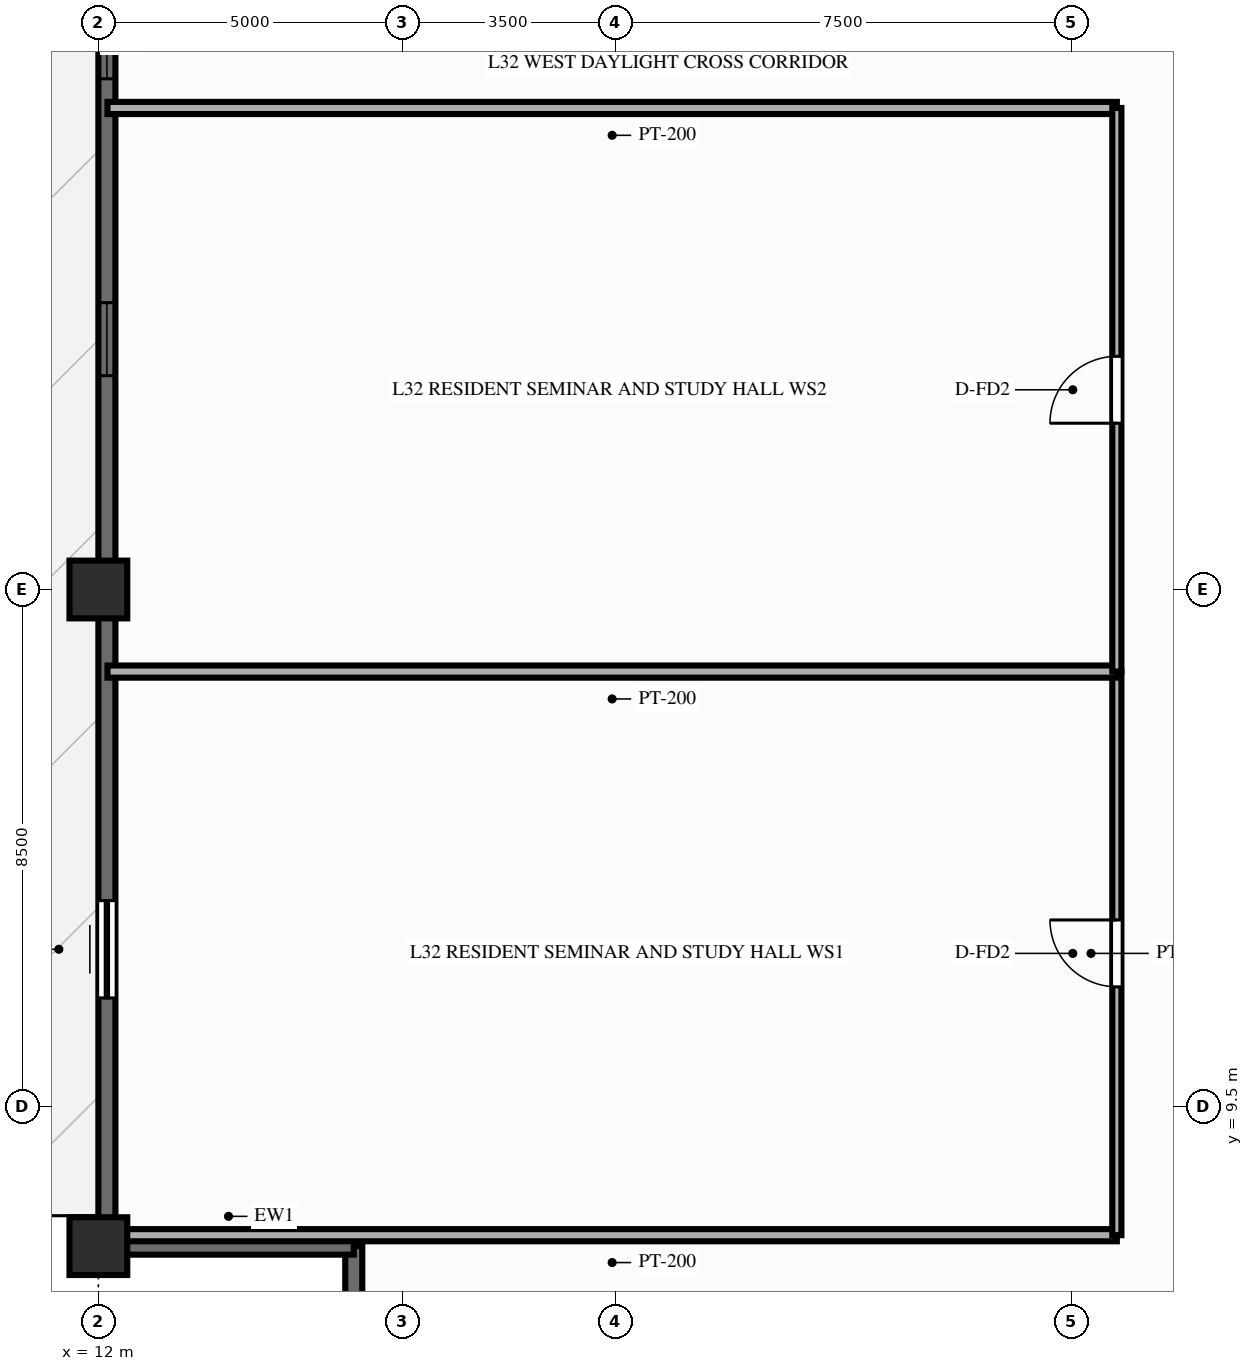
"""IFC4 building model, lengths in metres.
Left out: names, types, materials, properties, quantities, classifications, styles, units other than length and angle.
Written with IfcOpenShell. Run it as: python <this file> out.ifc"""

import sys

from ifc_helpers import new_model, si_unit, direction, frame, frame_2d, origin, origin_2d, place, context, subcontext, project, spatial, rectangle, extrude, source, transform, mapped, element, fill, save


model = new_model("IFC4")
c1 = context("Model", 3, precision=1e-05, world=origin(), true_north=direction((0.0, 1.0)))
c2 = subcontext(c1, "Body", "Model", "MODEL_VIEW")
j1 = project(units=[si_unit("LENGTHUNIT", "METRE"), si_unit("PLANEANGLEUNIT", "RADIAN")], contexts=[c1])
p1 = place(None, origin())
s1 = spatial("IfcSite", under=j1, at=p1, CompositionType="ELEMENT")
p2 = place(p1, origin())
s2 = spatial("IfcBuilding", under=s1, at=p2, CompositionType="ELEMENT")
p3 = place(p2, frame((0.0, 0.0, 101.85)))
s3 = spatial("IfcBuildingStorey", under=s2, at=p3, CompositionType="ELEMENT", Elevation=101.85)
m1 = source(origin(), c2, "Body", "SweptSolid", [
    extrude(rectangle(XDim=0.95, YDim=0.95, at=origin_2d()), origin(), (0.0, 0.0, 1.0), 3.0),
])
for number, where, z_axis, x_axis in (
    (1, (12.0, 18.0, 0.0), (0.0, 0.0, 1.0), (1.0, 0.0, 0.0)),
    (2, (12.0, 7.2, 0.0), (0.0, 0.0, 1.0), (1.0, 0.0, 0.0)),
):
    element("IfcColumn", number, at=place(p3, frame(where, z_axis=z_axis, x_axis=x_axis)), inside=s3, PredefinedType="COLUMN", context=c2, shape_type="MappedRepresentation", body=[
        mapped(m1, transform((0.0, 0.0, 0.0), scale=1.0)),
    ])
p4 = place(p3, frame((12.14, 7.2, 0.0), z_axis=(0.0, 0.0, 1.0), x_axis=(0.0, 1.0, 0.0)))
e3 = element("IfcWall", 3, at=p4, inside=s3, PredefinedType="SOLIDWALL", context=c2, shape_type="SweptSolid", body=[
    extrude(rectangle(XDim=39.6, YDim=0.28, at=frame_2d((19.8, 0.0))), origin(), (0.0, 0.0, 1.0), 2.28),
])
p5 = place(p4, frame((4.083, 0.0, 0.0)))
e4 = element("IfcOpeningElement", 4, at=p5, cuts=e3, PredefinedType="OPENING", context=c2, shape_type="SweptSolid", body=[
    extrude(rectangle(XDim=1.6, YDim=2.15, at=frame_2d((0.8, 1.075))), frame((0.0, 0.152, 0.0), z_axis=(0.0, -1.0, 0.0), x_axis=(1.0, 0.0, 0.0)), (0.0, 0.0, 1.0), 0.304),
])
p6 = place(p4, frame((14.317, 0.0, 0.25)))
e5 = element("IfcOpeningElement", 5, at=p6, cuts=e3, PredefinedType="OPENING", context=c2, shape_type="SweptSolid", body=[
    extrude(rectangle(XDim=1.2, YDim=1.5, at=frame_2d((0.6, 0.75))), frame((0.0, 0.152, 0.0), z_axis=(0.0, -1.0, 0.0), x_axis=(1.0, 0.0, 0.0)), (0.0, 0.0, 1.0), 0.304),
])
p7 = place(p4, frame((19.2, 0.0, 0.25)))
e6 = element("IfcOpeningElement", 6, at=p7, cuts=e3, PredefinedType="OPENING", context=c2, shape_type="SweptSolid", body=[
    extrude(rectangle(XDim=1.2, YDim=1.5, at=frame_2d((0.6, 0.75))), frame((0.0, 0.152, 0.0), z_axis=(0.0, -1.0, 0.0), x_axis=(1.0, 0.0, 0.0)), (0.0, 0.0, 1.0), 0.304),
])
p8 = place(p4, frame((24.083, 0.0, 0.25)))
e7 = element("IfcOpeningElement", 7, at=p8, cuts=e3, PredefinedType="OPENING", context=c2, shape_type="SweptSolid", body=[
    extrude(rectangle(XDim=1.2, YDim=1.5, at=frame_2d((0.6, 0.75))), frame((0.0, 0.152, 0.0), z_axis=(0.0, -1.0, 0.0), x_axis=(1.0, 0.0, 0.0)), (0.0, 0.0, 1.0), 0.304),
])
p9 = place(p4, frame((34.117, 0.0, 0.25)))
e8 = element("IfcOpeningElement", 8, at=p9, cuts=e3, PredefinedType="OPENING", context=c2, shape_type="SweptSolid", body=[
    extrude(rectangle(XDim=1.2, YDim=1.5, at=frame_2d((0.6, 0.75))), frame((0.0, 0.152, 0.0), z_axis=(0.0, -1.0, 0.0), x_axis=(1.0, 0.0, 0.0)), (0.0, 0.0, 1.0), 0.304),
])
for number, where, z_axis, x_axis in (
    (9, (16.2, 3.08, 0.0), (0.0, 0.0, 1.0), (0.0, 1.0, 0.0)),
    (10, (12.08, 7.2, 0.0), (0.0, 0.0, 1.0), (1.0, 0.0, 0.0)),
):
    element("IfcWall", number, at=place(p3, frame(where, z_axis=z_axis, x_axis=x_axis)), inside=s3, PredefinedType="SOLIDWALL", context=c2, shape_type="SweptSolid", body=[
        extrude(rectangle(XDim=4.12, YDim=0.28, at=frame_2d((2.06, 0.0))), origin(), (0.0, 0.0, 1.0), 2.28),
    ])
for number, where, z_axis, x_axis in (
    (11, (28.75, 7.38, 0.0), (0.0, 0.0, 1.0), (-1.0, 0.0, 0.0)),
    (12, (28.75, 25.92, 0.0), (0.0, 0.0, 1.0), (-1.0, 0.0, 0.0)),
):
    element("IfcWall", number, at=place(p3, frame(where, z_axis=z_axis, x_axis=x_axis)), inside=s3, PredefinedType="PARTITIONING", context=c2, shape_type="SweptSolid", body=[
        extrude(rectangle(XDim=16.6, YDim=0.2, at=frame_2d((8.3, 0.0))), origin(), (0.0, 0.0, 1.0), 2.79),
    ])
p10 = place(p3, frame((28.75, 7.38, 0.0), z_axis=(0.0, 0.0, 1.0), x_axis=(0.0, 1.0, 0.0)))
e13 = element("IfcWall", 13, at=p10, inside=s3, PredefinedType="PARTITIONING", context=c2, shape_type="SweptSolid", body=[
    extrude(rectangle(XDim=9.27, YDim=0.15, at=frame_2d((4.635, 0.0))), origin(), (0.0, 0.0, 1.0), 2.79),
])
p11 = place(p10, frame((4.085, 0.0, 0.0)))
e14 = element("IfcOpeningElement", 14, at=p11, cuts=e13, PredefinedType="OPENING", context=c2, shape_type="SweptSolid", body=[
    extrude(rectangle(XDim=1.1, YDim=2.15, at=frame_2d((0.55, 1.075))), frame((0.0, 0.087, 0.0), z_axis=(0.0, -1.0, 0.0), x_axis=(1.0, 0.0, 0.0)), (0.0, 0.0, 1.0), 0.174),
])
p12 = place(p3, frame((28.75, 16.65, 0.0), z_axis=(0.0, 0.0, 1.0), x_axis=(-1.0, 0.0, 0.0)))
e15 = element("IfcWall", 15, at=p12, inside=s3, PredefinedType="PARTITIONING", context=c2, shape_type="SweptSolid", body=[
    extrude(rectangle(XDim=16.6, YDim=0.2, at=frame_2d((8.3, 0.0))), origin(), (0.0, 0.0, 1.0), 2.79),
])
p13 = place(p3, frame((28.75, 16.65, 0.0), z_axis=(0.0, 0.0, 1.0), x_axis=(0.0, 1.0, 0.0)))
e16 = element("IfcWall", 16, at=p13, inside=s3, PredefinedType="PARTITIONING", context=c2, shape_type="SweptSolid", body=[
    extrude(rectangle(XDim=9.27, YDim=0.15, at=frame_2d((4.635, 0.0))), origin(), (0.0, 0.0, 1.0), 2.79),
])
p14 = place(p13, frame((4.085, 0.0, 0.0)))
e17 = element("IfcOpeningElement", 17, at=p14, cuts=e16, PredefinedType="OPENING", context=c2, shape_type="SweptSolid", body=[
    extrude(rectangle(XDim=1.1, YDim=2.15, at=frame_2d((0.55, 1.075))), frame((0.0, 0.087, 0.0), z_axis=(0.0, -1.0, 0.0), x_axis=(1.0, 0.0, 0.0)), (0.0, 0.0, 1.0), 0.174),
])
m2 = source(origin(), c2, "Body", "SweptSolid", [
    extrude(rectangle(XDim=1.6, YDim=2.15, at=frame_2d((0.8, 1.075))), frame((0.0, 0.025, 0.0), z_axis=(0.0, -1.0, 0.0), x_axis=(1.0, 0.0, 0.0)), (0.0, 0.0, 1.0), 0.05),
])
p15 = place(p5, origin())
e18 = element("IfcDoor", 18, at=p15, inside=s3, OperationType="SLIDING_TO_LEFT", PredefinedType="DOOR", context=c2, shape_type="MappedRepresentation", body=[
    mapped(m2, transform((0.0, 0.0, 0.0), scale=1.0)),
])
fill(e4, e18)
m3 = source(origin(), c2, "Body", "SweptSolid", [
    extrude(rectangle(XDim=1.2, YDim=1.5, at=frame_2d((0.6, 0.75))), frame((0.0, 0.03, 0.0), z_axis=(0.0, -1.0, 0.0), x_axis=(1.0, 0.0, 0.0)), (0.0, 0.0, 1.0), 0.06),
])
p16 = place(p6, origin())
e19 = element("IfcWindow", 19, at=p16, inside=s3, PartitioningType="SINGLE_PANEL", PredefinedType="WINDOW", context=c2, shape_type="MappedRepresentation", body=[
    mapped(m3, transform((0.0, 0.0, 0.0), scale=1.0)),
])
fill(e5, e19)
p17 = place(p7, origin())
e20 = element("IfcWindow", 20, at=p17, inside=s3, PartitioningType="SINGLE_PANEL", PredefinedType="WINDOW", context=c2, shape_type="MappedRepresentation", body=[
    mapped(m3, transform((0.0, 0.0, 0.0), scale=1.0)),
])
fill(e6, e20)
m4 = source(origin(), c2, "Body", "SweptSolid", [
    extrude(rectangle(XDim=1.1, YDim=2.15, at=frame_2d((0.55, 1.075))), frame((0.0, 0.025, 0.0), z_axis=(0.0, -1.0, 0.0), x_axis=(1.0, 0.0, 0.0)), (0.0, 0.0, 1.0), 0.05),
])
p18 = place(p11, origin())
e21 = element("IfcDoor", 21, at=p18, inside=s3, OperationType="SINGLE_SWING_RIGHT", PredefinedType="DOOR", context=c2, shape_type="MappedRepresentation", body=[
    mapped(m4, transform((0.0, 0.0, 0.0), scale=1.0)),
])
fill(e14, e21)
p19 = place(p14, origin())
e22 = element("IfcDoor", 22, at=p19, inside=s3, OperationType="SINGLE_SWING_LEFT", PredefinedType="DOOR", context=c2, shape_type="MappedRepresentation", body=[
    mapped(m4, transform((0.0, 0.0, 0.0), scale=1.0)),
])
fill(e17, e22)
save(model, sys.argv[1])
